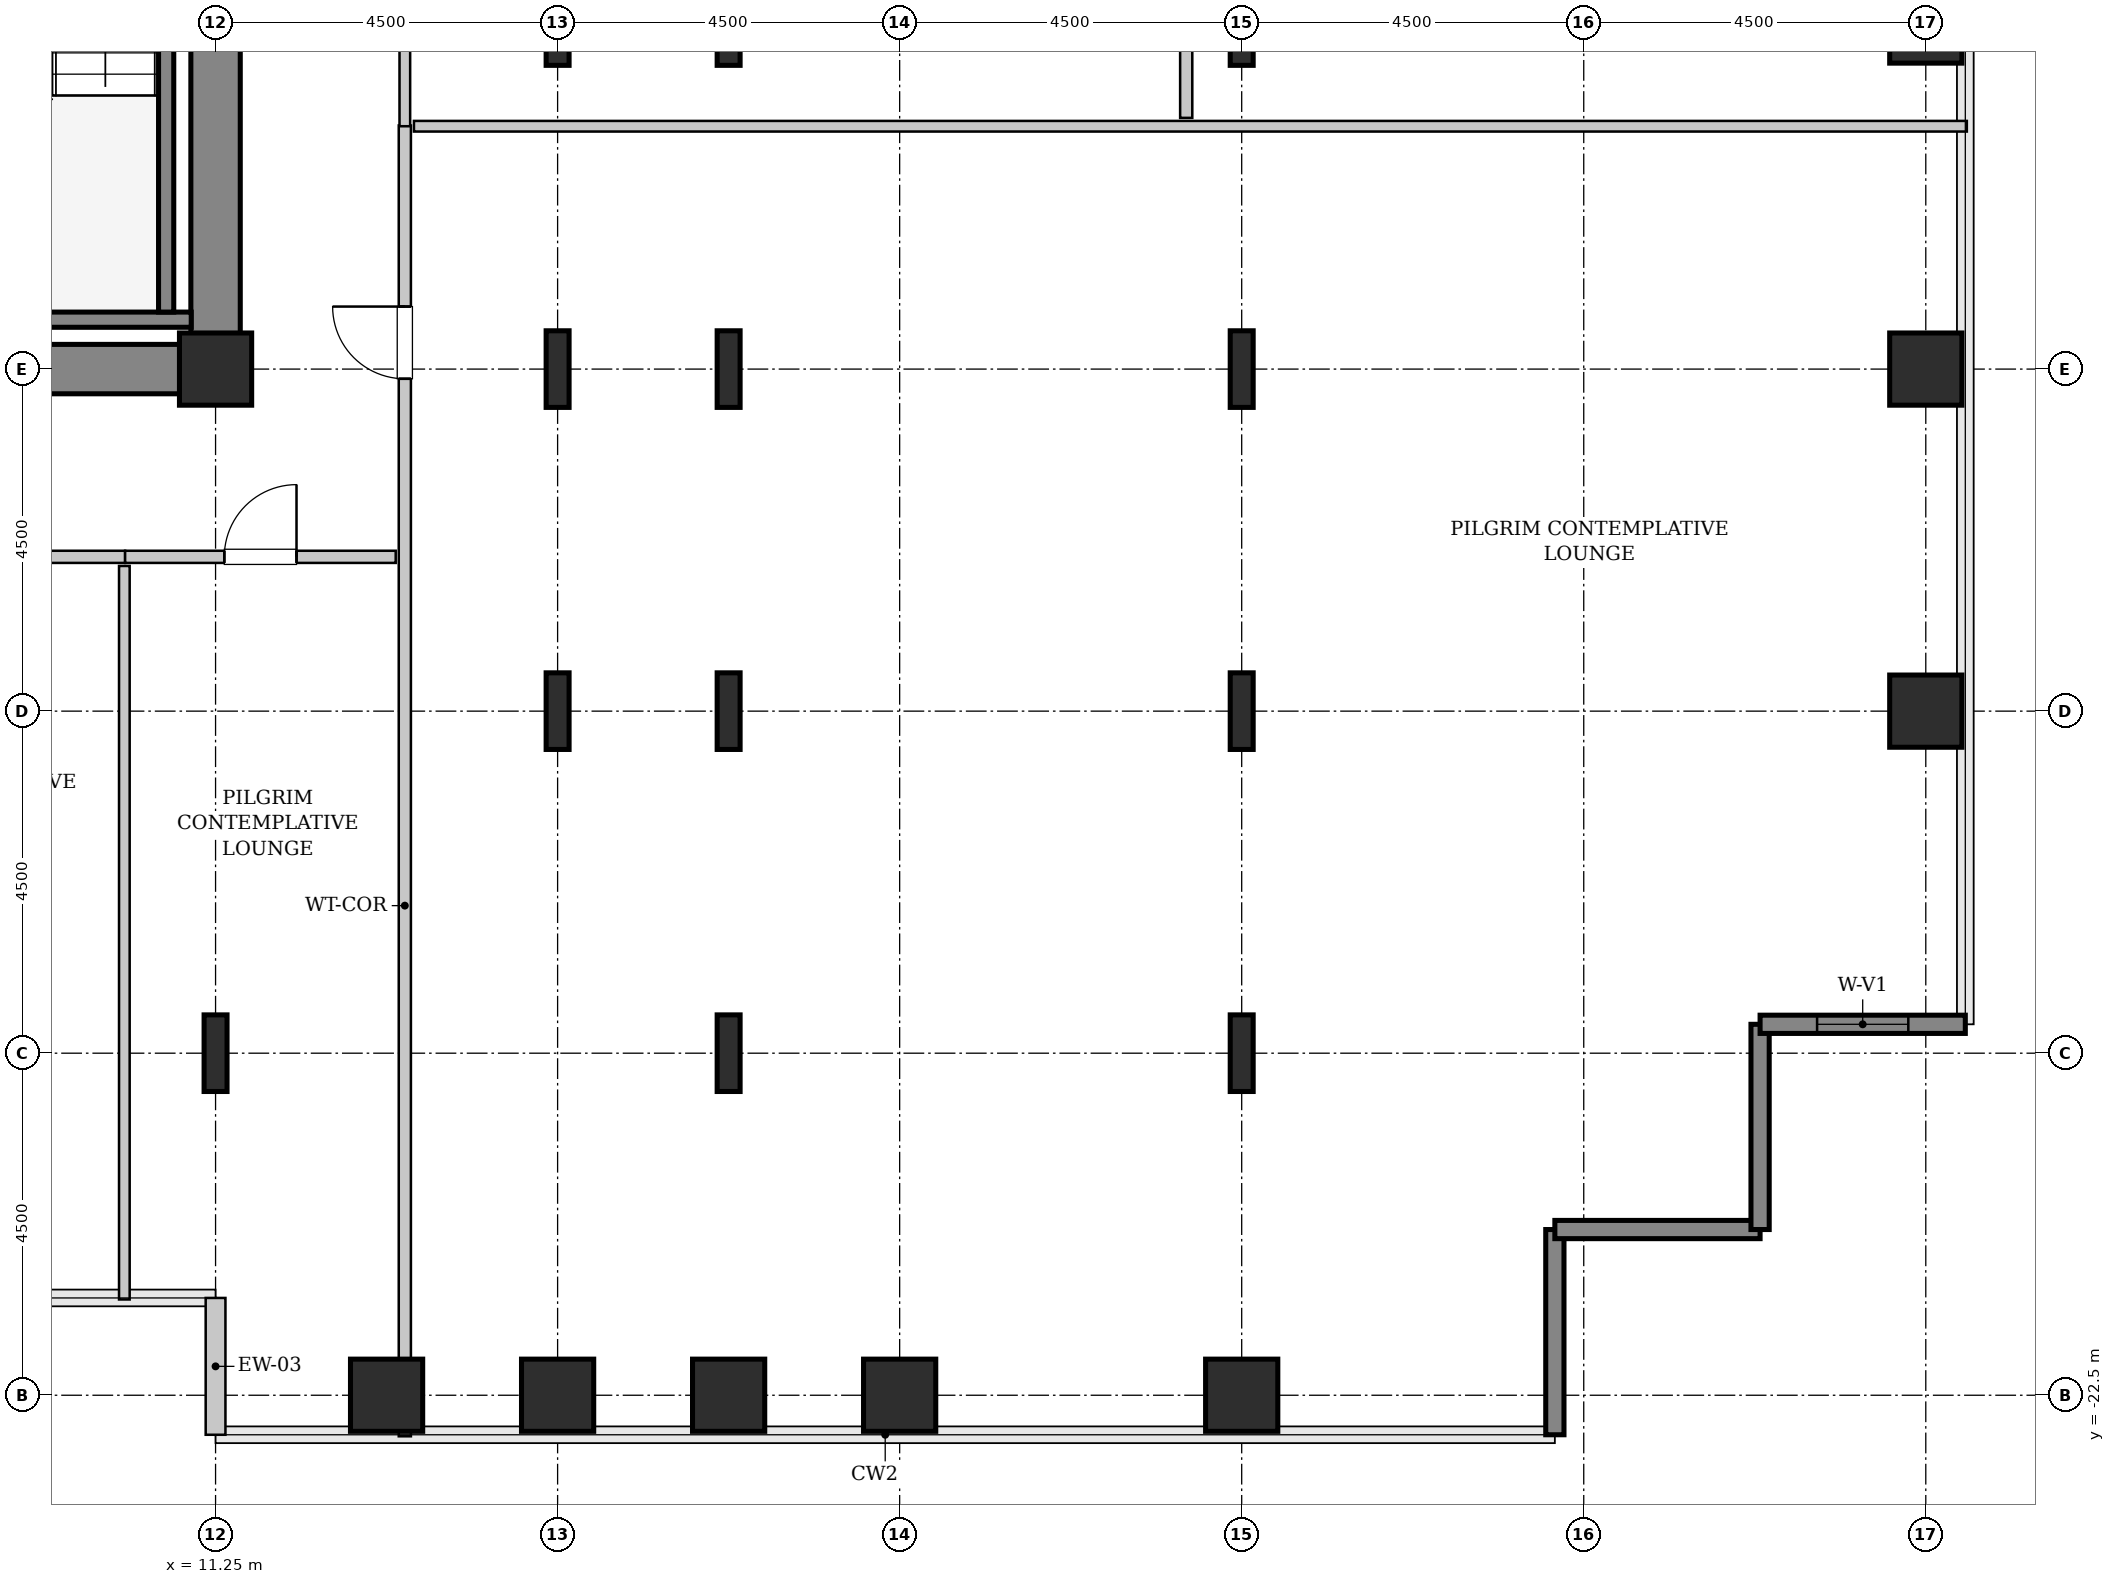
"""IFC4 building model, lengths in metres.
Left out: names, types, materials, properties, quantities, classifications, styles, units other than length and angle.
Written with IfcOpenShell. Run it as: python <this file> out.ifc"""

import sys

from ifc_helpers import new_model, si_unit, direction, frame, frame_2d, origin, origin_2d, place, context, subcontext, project, spatial, rectangle, hollow_rectangle, i_section, extrude, source, transform, mapped, element, fill, save


model = new_model("IFC4")
c1 = context("Model", 3, precision=1e-05, world=origin(), true_north=direction((0.0, 1.0)))
c2 = subcontext(c1, "Body", "Model", "MODEL_VIEW")
j1 = project(units=[si_unit("LENGTHUNIT", "METRE"), si_unit("PLANEANGLEUNIT", "RADIAN")], contexts=[c1])
p1 = place(None, origin())
s1 = spatial("IfcSite", under=j1, at=p1, CompositionType="ELEMENT")
p2 = place(p1, origin())
s2 = spatial("IfcBuilding", under=s1, at=p2, CompositionType="ELEMENT")
p3 = place(p2, frame((0.0, 0.0, 71.0)))
s3 = spatial("IfcBuildingStorey", under=s2, at=p3, CompositionType="ELEMENT", Elevation=71.0)
m1 = source(origin(), c2, "Body", "SweptSolid", [
    extrude(rectangle(XDim=10.025, YDim=0.65, at=frame_2d((5.012, 0.0))), origin(), (0.0, 0.0, 1.0), 3.8),
])
p4 = place(p3, frame((1.55, -9.0, 0.0), z_axis=(0.0, 0.0, 1.0), x_axis=(1.0, 0.0, 0.0)))
e1 = element("IfcWall", 1, at=p4, inside=s3, PredefinedType="SHEAR", context=c2, shape_type="MappedRepresentation", body=[
    mapped(m1, transform((0.0, 0.0, 0.0), x_axis=(1.0, 0.0, 0.0), y_axis=(0.0, 1.0, 0.0), z_axis=(0.0, 0.0, 1.0), scale=1.0)),
])
m2 = source(origin(), c2, "Body", "SweptSolid", [
    extrude(rectangle(XDim=7.325, YDim=0.65, at=frame_2d((3.663, 0.0))), origin(), (0.0, 0.0, 1.0), 3.8),
])
p5 = place(p3, frame((11.25, -8.675, 0.0), z_axis=(0.0, 0.0, 1.0), x_axis=(0.0, 1.0, 0.0)))
e2 = element("IfcWall", 2, at=p5, inside=s3, PredefinedType="SHEAR", context=c2, shape_type="MappedRepresentation", body=[
    mapped(m2, transform((0.0, 0.0, 0.0), x_axis=(1.0, 0.0, 0.0), y_axis=(0.0, 1.0, 0.0), z_axis=(0.0, 0.0, 1.0), scale=1.0)),
])
m3 = source(origin(), c2, "Body", "SweptSolid", [
    extrude(i_section(OverallWidth=0.302, OverallDepth=1.008, WebThickness=0.021, FlangeThickness=0.04, FilletRadius=0.03, at=origin_2d()), origin(), (0.0, 0.0, 1.0), 3.8),
])
p6 = place(p3, frame((11.25, -18.0, 0.0), z_axis=(0.0, 0.0, 1.0), x_axis=(1.0, 0.0, 0.0)))
e3 = element("IfcColumn", 3, at=p6, inside=s3, PredefinedType="COLUMN", context=c2, shape_type="MappedRepresentation", body=[
    mapped(m3, transform((0.0, 0.0, 0.0), x_axis=(1.0, 0.0, 0.0), y_axis=(0.0, 1.0, 0.0), z_axis=(0.0, 0.0, 1.0), scale=1.0)),
])
m4 = source(origin(), c2, "Body", "SweptSolid", [
    extrude(hollow_rectangle(XDim=0.95, YDim=0.95, WallThickness=0.045, InnerFilletRadius=0.045, OuterFilletRadius=0.09, at=origin_2d()), origin(), (0.0, 0.0, 1.0), 3.8),
])
p7 = place(p3, frame((11.25, -9.0, 0.0), z_axis=(0.0, 0.0, 1.0), x_axis=(1.0, 0.0, 0.0)))
e4 = element("IfcColumn", 4, at=p7, inside=s3, PredefinedType="COLUMN", context=c2, shape_type="MappedRepresentation", body=[
    mapped(m4, transform((0.0, 0.0, 0.0), x_axis=(1.0, 0.0, 0.0), y_axis=(0.0, 1.0, 0.0), z_axis=(0.0, 0.0, 1.0), scale=1.0)),
])
m5 = source(origin(), c2, "Body", "SweptSolid", [
    extrude(hollow_rectangle(XDim=0.95, YDim=0.95, WallThickness=0.045, InnerFilletRadius=0.045, OuterFilletRadius=0.09, at=origin_2d()), origin(), (0.0, 0.0, 1.0), 3.8),
])
for number, where, z_axis, x_axis in (
    (5, (13.5, -22.5, 0.0), (0.0, 0.0, 1.0), (1.0, 0.0, 0.0)),
    (6, (15.75, -22.5, 0.0), (0.0, 0.0, 1.0), (1.0, 0.0, 0.0)),
):
    element("IfcColumn", number, at=place(p3, frame(where, z_axis=z_axis, x_axis=x_axis)), inside=s3, PredefinedType="COLUMN", context=c2, shape_type="MappedRepresentation", body=[
        mapped(m5, transform((0.0, 0.0, 0.0), x_axis=(1.0, 0.0, 0.0), y_axis=(0.0, 1.0, 0.0), z_axis=(0.0, 0.0, 1.0), scale=1.0)),
    ])
for number, where, z_axis, x_axis in (
    (7, (15.75, -13.5, 0.0), (0.0, 0.0, 1.0), (1.0, 0.0, 0.0)),
    (8, (15.75, -9.0, 0.0), (0.0, 0.0, 1.0), (1.0, 0.0, 0.0)),
    (9, (15.75, -4.5, 0.0), (0.0, 0.0, 1.0), (1.0, 0.0, 0.0)),
):
    element("IfcColumn", number, at=place(p3, frame(where, z_axis=z_axis, x_axis=x_axis)), inside=s3, PredefinedType="COLUMN", context=c2, shape_type="MappedRepresentation", body=[
        mapped(m3, transform((0.0, 0.0, 0.0), x_axis=(1.0, 0.0, 0.0), y_axis=(0.0, 1.0, 0.0), z_axis=(0.0, 0.0, 1.0), scale=1.0)),
    ])
p8 = place(p3, frame((18.0, -22.5, 0.0), z_axis=(0.0, 0.0, 1.0), x_axis=(1.0, 0.0, 0.0)))
e10 = element("IfcColumn", 10, at=p8, inside=s3, PredefinedType="COLUMN", context=c2, shape_type="MappedRepresentation", body=[
    mapped(m5, transform((0.0, 0.0, 0.0), x_axis=(1.0, 0.0, 0.0), y_axis=(0.0, 1.0, 0.0), z_axis=(0.0, 0.0, 1.0), scale=1.0)),
])
for number, where, z_axis, x_axis in (
    (11, (18.0, -18.0, 0.0), (0.0, 0.0, 1.0), (1.0, 0.0, 0.0)),
    (12, (18.0, -13.5, 0.0), (0.0, 0.0, 1.0), (1.0, 0.0, 0.0)),
    (13, (18.0, -9.0, 0.0), (0.0, 0.0, 1.0), (1.0, 0.0, 0.0)),
    (14, (18.0, -4.5, 0.0), (0.0, 0.0, 1.0), (1.0, 0.0, 0.0)),
):
    element("IfcColumn", number, at=place(p3, frame(where, z_axis=z_axis, x_axis=x_axis)), inside=s3, PredefinedType="COLUMN", context=c2, shape_type="MappedRepresentation", body=[
        mapped(m3, transform((0.0, 0.0, 0.0), x_axis=(1.0, 0.0, 0.0), y_axis=(0.0, 1.0, 0.0), z_axis=(0.0, 0.0, 1.0), scale=1.0)),
    ])
for number, where, z_axis, x_axis in (
    (15, (20.25, -22.5, 0.0), (0.0, 0.0, 1.0), (1.0, 0.0, 0.0)),
    (16, (24.75, -22.5, 0.0), (0.0, 0.0, 1.0), (1.0, 0.0, 0.0)),
):
    element("IfcColumn", number, at=place(p3, frame(where, z_axis=z_axis, x_axis=x_axis)), inside=s3, PredefinedType="COLUMN", context=c2, shape_type="MappedRepresentation", body=[
        mapped(m5, transform((0.0, 0.0, 0.0), x_axis=(1.0, 0.0, 0.0), y_axis=(0.0, 1.0, 0.0), z_axis=(0.0, 0.0, 1.0), scale=1.0)),
    ])
for number, where, z_axis, x_axis in (
    (17, (24.75, -18.0, 0.0), (0.0, 0.0, 1.0), (1.0, 0.0, 0.0)),
    (18, (24.75, -13.5, 0.0), (0.0, 0.0, 1.0), (1.0, 0.0, 0.0)),
    (19, (24.75, -9.0, 0.0), (0.0, 0.0, 1.0), (1.0, 0.0, 0.0)),
    (20, (24.75, -4.5, 0.0), (0.0, 0.0, 1.0), (1.0, 0.0, 0.0)),
):
    element("IfcColumn", number, at=place(p3, frame(where, z_axis=z_axis, x_axis=x_axis)), inside=s3, PredefinedType="COLUMN", context=c2, shape_type="MappedRepresentation", body=[
        mapped(m3, transform((0.0, 0.0, 0.0), x_axis=(1.0, 0.0, 0.0), y_axis=(0.0, 1.0, 0.0), z_axis=(0.0, 0.0, 1.0), scale=1.0)),
    ])
for number, where, z_axis, x_axis in (
    (21, (33.75, -13.5, 0.0), (0.0, 0.0, 1.0), (1.0, 0.0, 0.0)),
    (22, (33.75, -9.0, 0.0), (0.0, 0.0, 1.0), (1.0, 0.0, 0.0)),
    (23, (33.75, -4.5, 0.0), (0.0, 0.0, 1.0), (1.0, 0.0, 0.0)),
):
    element("IfcColumn", number, at=place(p3, frame(where, z_axis=z_axis, x_axis=x_axis)), inside=s3, PredefinedType="COLUMN", context=c2, shape_type="MappedRepresentation", body=[
        mapped(m5, transform((0.0, 0.0, 0.0), x_axis=(1.0, 0.0, 0.0), y_axis=(0.0, 1.0, 0.0), z_axis=(0.0, 0.0, 1.0), scale=1.0)),
    ])
m6 = source(origin(), c2, "Body", "SweptSolid", [
    extrude(rectangle(XDim=1.8, YDim=0.26, at=frame_2d((0.9, 0.0))), origin(), (0.0, 0.0, 1.0), 3.55),
])
p9 = place(p3, frame((11.25, -21.22, 0.0), z_axis=(0.0, 0.0, 1.0), x_axis=(0.0, -1.0, 0.0)))
e24 = element("IfcWall", 24, at=p9, inside=s3, PredefinedType="SOLIDWALL", context=c2, shape_type="MappedRepresentation", body=[
    mapped(m6, transform((0.0, 0.0, 0.0), x_axis=(1.0, 0.0, 0.0), y_axis=(0.0, 1.0, 0.0), z_axis=(0.0, 0.0, 1.0), scale=1.0)),
])
m7 = source(origin(), c2, "Body", "SweptSolid", [
    extrude(rectangle(XDim=2.7, YDim=0.24, at=frame_2d((1.35, 0.0))), origin(), (0.0, 0.0, 1.0), 3.55),
])
for number, where, z_axis, x_axis in (
    (25, (28.87, -23.02, 0.0), (0.0, 0.0, 1.0), (0.0, 1.0, 0.0)),
    (26, (28.87, -20.32, 0.0), (0.0, 0.0, 1.0), (1.0, 0.0, 0.0)),
    (27, (31.57, -20.32, 0.0), (0.0, 0.0, 1.0), (0.0, 1.0, 0.0)),
):
    element("IfcWall", number, at=place(p3, frame(where, z_axis=z_axis, x_axis=x_axis)), inside=s3, PredefinedType="SHEAR", context=c2, shape_type="MappedRepresentation", body=[
        mapped(m7, transform((0.0, 0.0, 0.0), x_axis=(1.0, 0.0, 0.0), y_axis=(0.0, 1.0, 0.0), z_axis=(0.0, 0.0, 1.0), scale=1.0)),
    ])
p10 = place(p3, frame((31.57, -17.62, 0.0), z_axis=(0.0, 0.0, 1.0), x_axis=(1.0, 0.0, 0.0)))
e28 = element("IfcWall", 28, at=p10, inside=s3, PredefinedType="SHEAR", context=c2, shape_type="MappedRepresentation", body=[
    mapped(m7, transform((0.0, 0.0, 0.0), x_axis=(1.0, 0.0, 0.0), y_axis=(0.0, 1.0, 0.0), z_axis=(0.0, 0.0, 1.0), scale=1.0)),
])
p11 = place(p10, frame((0.75, 0.0, 0.85)))
e29 = element("IfcOpeningElement", 29, at=p11, cuts=e28, PredefinedType="OPENING", context=c2, shape_type="SweptSolid", body=[
    extrude(rectangle(XDim=1.2, YDim=1.8, at=frame_2d((0.6, 0.9))), frame((0.0, 0.13, 0.0), z_axis=(0.0, -1.0, 0.0), x_axis=(1.0, 0.0, 0.0)), (0.0, 0.0, 1.0), 0.26),
])
m8 = source(origin(), c2, "Body", "SweptSolid", [
    extrude(rectangle(XDim=3.63, YDim=0.2, at=frame_2d((1.815, 0.0))), origin(), (0.0, 0.0, 1.0), 3.8),
])
p12 = place(p3, frame((7.3, -8.35, 0.0), z_axis=(0.0, 0.0, 1.0), x_axis=(1.0, 0.0, 0.0)))
e30 = element("IfcWall", 30, at=p12, inside=s3, PredefinedType="SOLIDWALL", context=c2, shape_type="MappedRepresentation", body=[
    mapped(m8, transform((0.0, 0.0, 0.0), x_axis=(1.0, 0.0, 0.0), y_axis=(0.0, 1.0, 0.0), z_axis=(0.0, 0.0, 1.0), scale=1.0)),
])
m9 = source(origin(), c2, "Body", "SweptSolid", [
    extrude(rectangle(XDim=7.1, YDim=0.2, at=frame_2d((3.55, 0.0))), origin(), (0.0, 0.0, 1.0), 3.8),
])
p13 = place(p3, frame((10.6, -1.15, 0.0), z_axis=(0.0, 0.0, 1.0), x_axis=(0.0, -1.0, 0.0)))
e31 = element("IfcWall", 31, at=p13, inside=s3, PredefinedType="SOLIDWALL", context=c2, shape_type="MappedRepresentation", body=[
    mapped(m9, transform((0.0, 0.0, 0.0), x_axis=(1.0, 0.0, 0.0), y_axis=(0.0, 1.0, 0.0), z_axis=(0.0, 0.0, 1.0), scale=1.0)),
])
m10 = source(origin(), c2, "Body", "SweptSolid", [
    extrude(rectangle(XDim=17.245, YDim=0.16, at=frame_2d((8.623, 0.0))), origin(), (0.0, 0.0, 1.0), 3.535),
])
p14 = place(p3, frame((13.74, -23.04, 0.0), z_axis=(0.0, 0.0, 1.0), x_axis=(0.0, 1.0, 0.0)))
e32 = element("IfcWall", 32, at=p14, inside=s3, PredefinedType="PARTITIONING", context=c2, shape_type="MappedRepresentation", body=[
    mapped(m10, transform((0.0, 0.0, 0.0), x_axis=(1.0, 0.0, 0.0), y_axis=(0.0, 1.0, 0.0), z_axis=(0.0, 0.0, 1.0), scale=1.0)),
])
p15 = place(p14, frame((13.913, 0.0, 0.0)))
e33 = element("IfcOpeningElement", 33, at=p15, cuts=e32, PredefinedType="OPENING", context=c2, shape_type="SweptSolid", body=[
    extrude(rectangle(XDim=0.95, YDim=2.1, at=frame_2d((0.475, 1.05))), frame((0.0, 0.09, 0.0), z_axis=(0.0, -1.0, 0.0), x_axis=(1.0, 0.0, 0.0)), (0.0, 0.0, 1.0), 0.18),
])
m11 = source(origin(), c2, "Body", "SweptSolid", [
    extrude(rectangle(XDim=20.43, YDim=0.14, at=frame_2d((10.215, 0.0))), origin(), (0.0, 0.0, 1.0), 3.535),
])
p16 = place(p3, frame((13.86, -5.805, 0.0), z_axis=(0.0, 0.0, 1.0), x_axis=(1.0, 0.0, 0.0)))
e34 = element("IfcWall", 34, at=p16, inside=s3, PredefinedType="PARTITIONING", context=c2, shape_type="MappedRepresentation", body=[
    mapped(m11, transform((0.0, 0.0, 0.0), x_axis=(1.0, 0.0, 0.0), y_axis=(0.0, 1.0, 0.0), z_axis=(0.0, 0.0, 1.0), scale=1.0)),
])
m12 = source(origin(), c2, "Body", "SweptSolid", [
    extrude(rectangle(XDim=7.065, YDim=0.14, at=frame_2d((3.532, 0.0))), origin(), (0.0, 0.0, 1.0), 3.535),
])
p17 = place(p3, frame((13.74, -5.805, 0.0), z_axis=(0.0, 0.0, 1.0), x_axis=(0.0, 1.0, 0.0)))
e35 = element("IfcWall", 35, at=p17, inside=s3, PredefinedType="PARTITIONING", context=c2, shape_type="MappedRepresentation", body=[
    mapped(m12, transform((0.0, 0.0, 0.0), x_axis=(1.0, 0.0, 0.0), y_axis=(0.0, 1.0, 0.0), z_axis=(0.0, 0.0, 1.0), scale=1.0)),
])
m13 = source(origin(), c2, "Body", "SweptSolid", [
    extrude(rectangle(XDim=14.183, YDim=0.16, at=frame_2d((7.091, 0.0))), origin(), (0.0, 0.0, 1.0), 3.535),
])
p18 = place(p3, frame((24.02, -5.695, 0.0), z_axis=(0.0, 0.0, 1.0), x_axis=(0.0, 1.0, 0.0)))
e36 = element("IfcWall", 36, at=p18, inside=s3, PredefinedType="PARTITIONING", context=c2, shape_type="MappedRepresentation", body=[
    mapped(m13, transform((0.0, 0.0, 0.0), x_axis=(1.0, 0.0, 0.0), y_axis=(0.0, 1.0, 0.0), z_axis=(0.0, 0.0, 1.0), scale=1.0)),
])
p19 = place(p18, frame((7.47, 0.0, 0.0)))
e37 = element("IfcOpeningElement", 37, at=p19, cuts=e36, PredefinedType="OPENING", context=c2, shape_type="SweptSolid", body=[
    extrude(rectangle(XDim=0.95, YDim=2.1, at=frame_2d((0.475, 1.05))), frame((0.0, 0.09, 0.0), z_axis=(0.0, -1.0, 0.0), x_axis=(1.0, 0.0, 0.0)), (0.0, 0.0, 1.0), 0.18),
])
m14 = source(origin(), c2, "Body", "SweptSolid", [
    extrude(rectangle(XDim=3.665, YDim=0.16, at=frame_2d((1.833, 0.0))), origin(), (0.0, 0.0, 1.0), 3.535),
])
p20 = place(p3, frame((6.395, -11.47, 0.0), z_axis=(0.0, 0.0, 1.0), x_axis=(1.0, 0.0, 0.0)))
e38 = element("IfcWall", 38, at=p20, inside=s3, PredefinedType="PARTITIONING", context=c2, shape_type="MappedRepresentation", body=[
    mapped(m14, transform((0.0, 0.0, 0.0), x_axis=(1.0, 0.0, 0.0), y_axis=(0.0, 1.0, 0.0), z_axis=(0.0, 0.0, 1.0), scale=1.0)),
])
p21 = place(p20, frame((1.357, 0.0, 0.0)))
e39 = element("IfcOpeningElement", 39, at=p21, cuts=e38, PredefinedType="OPENING", context=c2, shape_type="SweptSolid", body=[
    extrude(rectangle(XDim=0.95, YDim=2.1, at=frame_2d((0.475, 1.05))), frame((0.0, 0.09, 0.0), z_axis=(0.0, -1.0, 0.0), x_axis=(1.0, 0.0, 0.0)), (0.0, 0.0, 1.0), 0.18),
])
m15 = source(origin(), c2, "Body", "SweptSolid", [
    extrude(rectangle(XDim=9.65, YDim=0.14, at=frame_2d((4.825, 0.0))), origin(), (0.0, 0.0, 1.0), 3.535),
])
p22 = place(p3, frame((10.05, -21.24, 0.0), z_axis=(0.0, 0.0, 1.0), x_axis=(0.0, 1.0, 0.0)))
e40 = element("IfcWall", 40, at=p22, inside=s3, PredefinedType="PARTITIONING", context=c2, shape_type="MappedRepresentation", body=[
    mapped(m15, transform((0.0, 0.0, 0.0), x_axis=(1.0, 0.0, 0.0), y_axis=(0.0, 1.0, 0.0), z_axis=(0.0, 0.0, 1.0), scale=1.0)),
])
m16 = source(origin(), c2, "Body", "SweptSolid", [
    extrude(rectangle(XDim=3.56, YDim=0.16, at=frame_2d((1.78, 0.0))), origin(), (0.0, 0.0, 1.0), 3.535),
])
p23 = place(p3, frame((10.06, -11.47, 0.0), z_axis=(0.0, 0.0, 1.0), x_axis=(1.0, 0.0, 0.0)))
e41 = element("IfcWall", 41, at=p23, inside=s3, PredefinedType="PARTITIONING", context=c2, shape_type="MappedRepresentation", body=[
    mapped(m16, transform((0.0, 0.0, 0.0), x_axis=(1.0, 0.0, 0.0), y_axis=(0.0, 1.0, 0.0), z_axis=(0.0, 0.0, 1.0), scale=1.0)),
])
p24 = place(p23, frame((1.305, 0.0, 0.0)))
e42 = element("IfcOpeningElement", 42, at=p24, cuts=e41, PredefinedType="OPENING", context=c2, shape_type="SweptSolid", body=[
    extrude(rectangle(XDim=0.95, YDim=2.1, at=frame_2d((0.475, 1.05))), frame((0.0, 0.09, 0.0), z_axis=(0.0, -1.0, 0.0), x_axis=(1.0, 0.0, 0.0)), (0.0, 0.0, 1.0), 0.18),
])
m17 = source(origin(), c2, "Body", "SweptSolid", [
    extrude(rectangle(XDim=1.2, YDim=1.8, at=frame_2d((0.6, 0.9))), frame((0.0, 0.03, 0.0), z_axis=(0.0, -1.0, 0.0), x_axis=(1.0, 0.0, 0.0)), (0.0, 0.0, 1.0), 0.06),
])
p25 = place(p11, origin())
e43 = element("IfcWindow", 43, at=p25, inside=s3, PartitioningType="SINGLE_PANEL", PredefinedType="WINDOW", context=c2, shape_type="MappedRepresentation", body=[
    mapped(m17, transform((0.0, 0.0, 0.0), x_axis=(1.0, 0.0, 0.0), y_axis=(0.0, 1.0, 0.0), z_axis=(0.0, 0.0, 1.0), scale=1.0)),
])
fill(e29, e43)
m18 = source(origin(), c2, "Body", "SweptSolid", [
    extrude(rectangle(XDim=0.95, YDim=2.1, at=frame_2d((0.475, 1.05))), frame((0.0, 0.025, 0.0), z_axis=(0.0, -1.0, 0.0), x_axis=(1.0, 0.0, 0.0)), (0.0, 0.0, 1.0), 0.05),
])
p26 = place(p15, origin())
e44 = element("IfcDoor", 44, at=p26, inside=s3, OperationType="SINGLE_SWING_RIGHT", PredefinedType="DOOR", context=c2, shape_type="MappedRepresentation", body=[
    mapped(m18, transform((0.0, 0.0, 0.0), x_axis=(1.0, 0.0, 0.0), y_axis=(0.0, 1.0, 0.0), z_axis=(0.0, 0.0, 1.0), scale=1.0)),
])
fill(e33, e44)
p27 = place(p24, origin())
e45 = element("IfcDoor", 45, at=p27, inside=s3, OperationType="SINGLE_SWING_RIGHT", PredefinedType="DOOR", context=c2, shape_type="MappedRepresentation", body=[
    mapped(m18, transform((0.0, 0.0, 0.0), x_axis=(1.0, 0.0, 0.0), y_axis=(0.0, 1.0, 0.0), z_axis=(0.0, 0.0, 1.0), scale=1.0)),
])
fill(e42, e45)
save(model, sys.argv[1])
